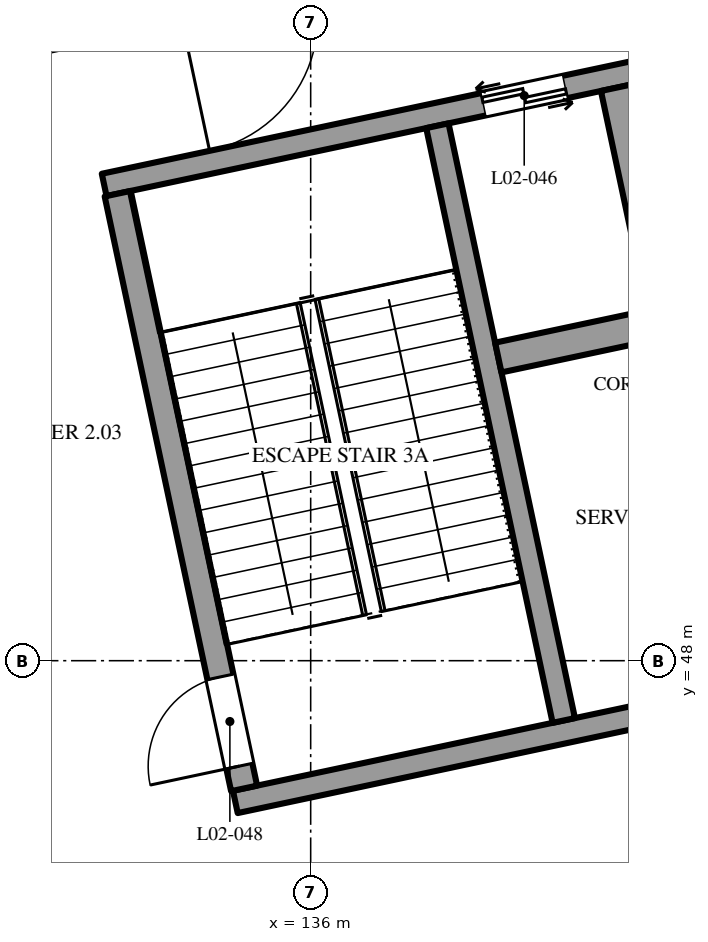
"""IFC4 building model, lengths in metres.
Left out: names, types, materials, properties, quantities, classifications, styles, units other than length and angle.
Written with IfcOpenShell. Run it as: python <this file> out.ifc"""

import sys

from ifc_helpers import new_model, si_unit, direction, frame, frame_2d, origin, place, context, subcontext, project, spatial, rectangle, extrude, element, fill, save


model = new_model("IFC4")
c1 = context("Model", 3, precision=1e-05, world=origin(), true_north=direction((0.0, 1.0)))
c2 = subcontext(c1, "Body", "Model", "MODEL_VIEW")
j1 = project(units=[si_unit("LENGTHUNIT", "METRE"), si_unit("PLANEANGLEUNIT", "RADIAN")], contexts=[c1])
p1 = place(None, origin())
s1 = spatial("IfcSite", under=j1, at=p1, CompositionType="ELEMENT")
p2 = place(p1, origin())
s2 = spatial("IfcBuilding", under=s1, at=p2, CompositionType="ELEMENT")
p3 = place(p2, frame((0.0, 0.0, 12.0)))
s3 = spatial("IfcBuildingStorey", under=s2, at=p3, CompositionType="ELEMENT", Elevation=12.0)
p4 = place(p3, frame((135.009, 46.142, 0.0), z_axis=(0.0, 0.0, 1.0), x_axis=(0.978147662755, 0.20791139903, 0.0)))
e1 = element("IfcWall", 1, at=p4, inside=s3, PredefinedType="SHEAR", context=c2, shape_type="SweptSolid", body=[
    extrude(rectangle(XDim=13.7, YDim=0.3, at=frame_2d((6.85, 0.0))), origin(), (0.0, 0.0, 1.0), 4.8),
])
p5 = place(p4, frame((6.35, 0.0, 0.0)))
e2 = element("IfcOpeningElement", 2, at=p5, cuts=e1, PredefinedType="OPENING", context=c2, shape_type="SweptSolid", body=[
    extrude(rectangle(XDim=1.0, YDim=2.1, at=frame_2d((0.5, 1.05))), frame((0.0, 0.16, 0.0), z_axis=(0.0, -1.0, 0.0), x_axis=(1.0, 0.0, 0.0)), (0.0, 0.0, 1.0), 0.32),
])
p6 = place(p3, frame((133.283, 54.26, 0.0), z_axis=(0.0, 0.0, 1.0), x_axis=(0.978147662755, 0.20791139903, 0.0)))
e3 = element("IfcWall", 3, at=p6, inside=s3, PredefinedType="SHEAR", context=c2, shape_type="SweptSolid", body=[
    extrude(rectangle(XDim=13.7, YDim=0.3, at=frame_2d((6.85, 0.0))), origin(), (0.0, 0.0, 1.0), 4.8),
])
p7 = place(p6, frame((5.1, 0.0, 0.0)))
e4 = element("IfcOpeningElement", 4, at=p7, cuts=e3, PredefinedType="OPENING", context=c2, shape_type="SweptSolid", body=[
    extrude(rectangle(XDim=1.1, YDim=2.1, at=frame_2d((0.55, 1.05))), frame((0.0, 0.16, 0.0), z_axis=(0.0, -1.0, 0.0), x_axis=(1.0, 0.0, 0.0)), (0.0, 0.0, 1.0), 0.32),
])
p8 = place(p6, frame((7.5, 0.0, 0.0)))
e5 = element("IfcOpeningElement", 5, at=p8, cuts=e3, PredefinedType="OPENING", context=c2, shape_type="SweptSolid", body=[
    extrude(rectangle(XDim=1.1, YDim=2.1, at=frame_2d((0.55, 1.05))), frame((0.0, 0.16, 0.0), z_axis=(0.0, -1.0, 0.0), x_axis=(1.0, 0.0, 0.0)), (0.0, 0.0, 1.0), 0.32),
])
p9 = place(p3, frame((135.124, 46.32, 0.0), z_axis=(0.0, 0.0, 1.0), x_axis=(-0.207886494942, 0.978152955943, 0.0)))
e6 = element("IfcWall", 6, at=p9, inside=s3, PredefinedType="SOLIDWALL", context=c2, shape_type="SweptSolid", body=[
    extrude(rectangle(XDim=8.0, YDim=0.35, at=frame_2d((4.0, 0.0))), origin(), (0.0, 0.0, 1.0), 4.8),
])
p10 = place(p9, frame((0.3, 0.0, 0.0)))
e7 = element("IfcOpeningElement", 7, at=p10, cuts=e6, PredefinedType="OPENING", context=c2, shape_type="SweptSolid", body=[
    extrude(rectangle(XDim=1.2, YDim=2.1, at=frame_2d((0.6, 1.05))), frame((0.0, 0.185, 0.0), z_axis=(0.0, -1.0, 0.0), x_axis=(1.0, 0.0, 0.0)), (0.0, 0.0, 1.0), 0.37),
])
p11 = place(p3, frame((139.33, 47.214, 0.0), z_axis=(0.0, 0.0, 1.0), x_axis=(-0.207915693476, 0.978146749934, 0.0)))
e8 = element("IfcWall", 8, at=p11, inside=s3, PredefinedType="SHEAR", context=c2, shape_type="SweptSolid", body=[
    extrude(rectangle(XDim=8.0, YDim=0.3, at=frame_2d((4.0, 0.0))), origin(), (0.0, 0.0, 1.0), 4.8),
])
p12 = place(p3, frame((140.638, 52.603, 0.0), z_axis=(0.0, 0.0, 1.0), x_axis=(-0.207917150959, 0.978146440129, 0.0)))
e9 = element("IfcWall", 9, at=p12, inside=s3, PredefinedType="SHEAR", context=c2, shape_type="SweptSolid", body=[
    extrude(rectangle(XDim=3.0, YDim=0.4, at=frame_2d((1.5, 0.0))), origin(), (0.0, 0.0, 1.0), 4.8),
])
p13 = place(p3, frame((138.469, 51.989, 0.0), z_axis=(0.0, 0.0, 1.0), x_axis=(0.978149611564, 0.20790223038, 0.0)))
e10 = element("IfcWall", 10, at=p13, inside=s3, PredefinedType="SHEAR", context=c2, shape_type="SweptSolid", body=[
    extrude(rectangle(XDim=4.5, YDim=0.4, at=frame_2d((2.25, 0.0))), origin(), (0.0, 0.0, 1.0), 4.8),
])
p14 = place(p3, frame((115.369, 52.446, 0.0), z_axis=(0.0, 0.0, 1.0), x_axis=(0.978147028863, 0.207914381239, 0.0)))
e11 = element("IfcWall", 11, at=p14, inside=s3, PredefinedType="PARTITIONING", context=c2, shape_type="SweptSolid", body=[
    extrude(rectangle(XDim=49.5, YDim=0.15, at=frame_2d((24.75, 0.0))), origin(), (0.0, 0.0, 1.0), 3.75),
])
p15 = place(p14, frame((5.85, 0.0, 0.0)))
e12 = element("IfcOpeningElement", 12, at=p15, cuts=e11, PredefinedType="OPENING", context=c2, shape_type="SweptSolid", body=[
    extrude(rectangle(XDim=1.8, YDim=2.1, at=frame_2d((0.9, 1.05))), frame((0.0, 0.085, 0.0), z_axis=(0.0, -1.0, 0.0), x_axis=(1.0, 0.0, 0.0)), (0.0, 0.0, 1.0), 0.17),
])
p16 = place(p14, frame((19.35, 0.0, 0.0)))
e13 = element("IfcOpeningElement", 13, at=p16, cuts=e11, PredefinedType="OPENING", context=c2, shape_type="SweptSolid", body=[
    extrude(rectangle(XDim=1.8, YDim=2.1, at=frame_2d((0.9, 1.05))), frame((0.0, 0.085, 0.0), z_axis=(0.0, -1.0, 0.0), x_axis=(1.0, 0.0, 0.0)), (0.0, 0.0, 1.0), 0.17),
])
p17 = place(p14, frame((28.8, 0.0, 0.0)))
e14 = element("IfcOpeningElement", 14, at=p17, cuts=e11, PredefinedType="OPENING", context=c2, shape_type="SweptSolid", body=[
    extrude(rectangle(XDim=0.9, YDim=2.1, at=frame_2d((0.45, 1.05))), frame((0.0, 0.085, 0.0), z_axis=(0.0, -1.0, 0.0), x_axis=(1.0, 0.0, 0.0)), (0.0, 0.0, 1.0), 0.17),
])
p18 = place(p14, frame((33.25, 0.0, 0.0)))
e15 = element("IfcOpeningElement", 15, at=p18, cuts=e11, PredefinedType="OPENING", context=c2, shape_type="SweptSolid", body=[
    extrude(rectangle(XDim=1.0, YDim=2.1, at=frame_2d((0.5, 1.05))), frame((0.0, 0.085, 0.0), z_axis=(0.0, -1.0, 0.0), x_axis=(1.0, 0.0, 0.0)), (0.0, 0.0, 1.0), 0.17),
])
p19 = place(p14, frame((41.7, 0.0, 0.0)))
e16 = element("IfcOpeningElement", 16, at=p19, cuts=e11, PredefinedType="OPENING", context=c2, shape_type="SweptSolid", body=[
    extrude(rectangle(XDim=2.1, YDim=2.4, at=frame_2d((1.05, 1.2))), frame((0.0, 0.085, 0.0), z_axis=(0.0, -1.0, 0.0), x_axis=(1.0, 0.0, 0.0)), (0.0, 0.0, 1.0), 0.17),
])
p20 = place(p7, origin())
e17 = element("IfcDoor", 17, at=p20, inside=s3, OperationType="DOUBLE_DOOR_SLIDING", PredefinedType="DOOR", context=c2, shape_type="SweptSolid", body=[
    extrude(rectangle(XDim=1.1, YDim=2.1, at=frame_2d((0.55, 1.05))), frame((0.0, 0.025, 0.0), z_axis=(0.0, -1.0, 0.0), x_axis=(1.0, 0.0, 0.0)), (0.0, 0.0, 1.0), 0.05),
])
fill(e4, e17)
p21 = place(p10, origin())
e18 = element("IfcDoor", 18, at=p21, inside=s3, OperationType="SINGLE_SWING_LEFT", PredefinedType="DOOR", context=c2, shape_type="SweptSolid", body=[
    extrude(rectangle(XDim=1.2, YDim=2.1, at=frame_2d((0.6, 1.05))), frame((0.0, 0.025, 0.0), z_axis=(0.0, -1.0, 0.0), x_axis=(1.0, 0.0, 0.0)), (0.0, 0.0, 1.0), 0.05),
])
fill(e7, e18)
save(model, sys.argv[1])
